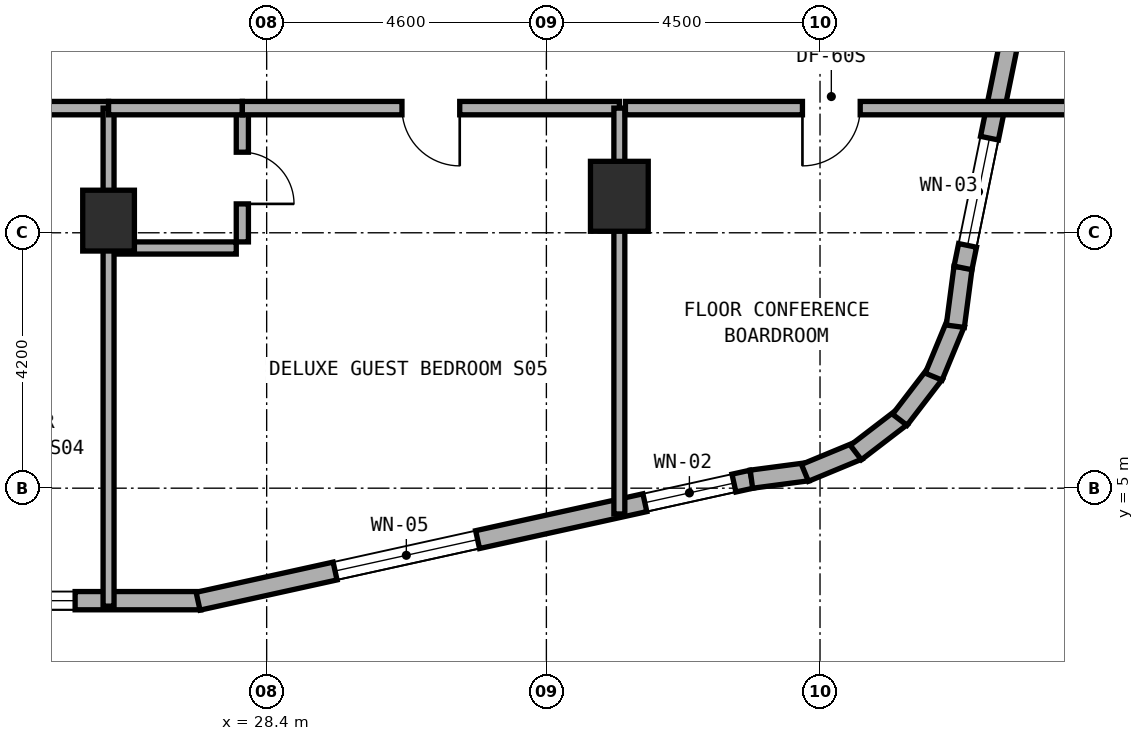
"""IFC4 building model, lengths in metres.
Left out: names, types, materials, properties, quantities, classifications, styles, units other than length and angle.
Written with IfcOpenShell. Run it as: python <this file> out.ifc"""

import sys

from ifc_helpers import new_model, si_unit, direction, frame, frame_2d, origin, origin_2d, place, context, subcontext, project, spatial, rectangle, extrude, element, fill, save


model = new_model("IFC4")
c1 = context("Model", 3, precision=1e-05, world=origin(), true_north=direction((0.0, 1.0)))
c2 = subcontext(c1, "Body", "Model", "MODEL_VIEW")
j1 = project(units=[si_unit("LENGTHUNIT", "METRE"), si_unit("PLANEANGLEUNIT", "RADIAN")], contexts=[c1])
p1 = place(None, origin())
s1 = spatial("IfcSite", under=j1, at=p1, CompositionType="ELEMENT")
p2 = place(p1, origin())
s2 = spatial("IfcBuilding", under=s1, at=p2, CompositionType="ELEMENT")
p3 = place(p2, frame((0.0, 0.0, 80.0)))
s3 = spatial("IfcBuildingStorey", under=s2, at=p3, CompositionType="ELEMENT", Elevation=80.0)
p4 = place(p3, frame((25.8, 9.4, 0.0), z_axis=(0.0, 0.0, 1.0), x_axis=(1.0, 0.0, 0.0)))
e1 = element("IfcColumn", 1, at=p4, inside=s3, PredefinedType="COLUMN", context=c2, shape_type="SweptSolid", body=[
    extrude(rectangle(XDim=0.85, YDim=1.0, at=origin_2d()), origin(), (0.0, 0.0, 1.0), 3.5),
])
p5 = place(p3, frame((34.2, 9.8, 0.0), z_axis=(0.0, 0.0, 1.0), x_axis=(1.0, 0.0, 0.0)))
e2 = element("IfcColumn", 2, at=p5, inside=s3, PredefinedType="COLUMN", context=c2, shape_type="SweptSolid", body=[
    extrude(rectangle(XDim=0.95, YDim=1.15, at=origin_2d()), origin(), (0.0, 0.0, 1.0), 3.5),
])
p6 = place(p3, frame((14.727, 3.15, 0.0), z_axis=(0.0, 0.0, 1.0), x_axis=(1.0, 0.0, 0.0)))
e3 = element("IfcWall", 3, at=p6, inside=s3, PredefinedType="STANDARD", context=c2, shape_type="SweptSolid", body=[
    extrude(rectangle(XDim=12.591, YDim=0.3, at=frame_2d((6.295, 0.0))), origin(), (0.0, 0.0, 1.0), 3.22),
])
p7 = place(p6, frame((5.713, 0.0, 0.0)))
e4 = element("IfcOpeningElement", 4, at=p7, cuts=e3, PredefinedType="OPENING", context=c2, shape_type="SweptSolid", body=[
    extrude(rectangle(XDim=1.2, YDim=2.15, at=frame_2d((0.6, 1.075))), frame((0.0, 0.16, 0.0), z_axis=(0.0, -1.0, 0.0), x_axis=(1.0, 0.0, 0.0)), (0.0, 0.0, 1.0), 0.32),
])
p8 = place(p6, frame((1.552, 0.0, 0.8)))
e5 = element("IfcOpeningElement", 5, at=p8, cuts=e3, PredefinedType="OPENING", context=c2, shape_type="SweptSolid", body=[
    extrude(rectangle(XDim=2.4, YDim=1.6, at=frame_2d((1.2, 0.8))), frame((0.0, 0.16, 0.0), z_axis=(0.0, -1.0, 0.0), x_axis=(1.0, 0.0, 0.0)), (0.0, 0.0, 1.0), 0.32),
])
p9 = place(p6, frame((8.723, 0.0, 0.85)))
e6 = element("IfcOpeningElement", 6, at=p9, cuts=e3, PredefinedType="OPENING", context=c2, shape_type="SweptSolid", body=[
    extrude(rectangle(XDim=1.8, YDim=1.5, at=frame_2d((0.9, 0.75))), frame((0.0, 0.16, 0.0), z_axis=(0.0, -1.0, 0.0), x_axis=(1.0, 0.0, 0.0)), (0.0, 0.0, 1.0), 0.32),
])
p10 = place(p3, frame((27.272, 3.141, 0.0), z_axis=(0.0, 0.0, 1.0), x_axis=(0.976555357219, 0.21526642629, 0.0)))
e7 = element("IfcWall", 7, at=p10, inside=s3, PredefinedType="STANDARD", context=c2, shape_type="SweptSolid", body=[
    extrude(rectangle(XDim=9.323, YDim=0.3, at=frame_2d((4.661, 0.0))), origin(), (0.0, 0.0, 1.0), 3.22),
])
p11 = place(p10, frame((2.307, 0.0, 0.8)))
e8 = element("IfcOpeningElement", 8, at=p11, cuts=e7, PredefinedType="OPENING", context=c2, shape_type="SweptSolid", body=[
    extrude(rectangle(XDim=2.4, YDim=1.6, at=frame_2d((1.2, 0.8))), frame((0.0, 0.16, 0.0), z_axis=(0.0, -1.0, 0.0), x_axis=(1.0, 0.0, 0.0)), (0.0, 0.0, 1.0), 0.32),
])
p12 = place(p10, frame((7.524, 0.0, 0.85)))
e9 = element("IfcOpeningElement", 9, at=p12, cuts=e7, PredefinedType="OPENING", context=c2, shape_type="SweptSolid", body=[
    extrude(rectangle(XDim=1.5, YDim=1.5, at=frame_2d((0.75, 0.75))), frame((0.0, 0.16, 0.0), z_axis=(0.0, -1.0, 0.0), x_axis=(1.0, 0.0, 0.0)), (0.0, 0.0, 1.0), 0.32),
])
p13 = place(p3, frame((36.372, 5.148, 0.0), z_axis=(0.0, 0.0, 1.0), x_axis=(0.991359246108, 0.131174864804, 0.0)))
e10 = element("IfcWall", 10, at=p13, inside=s3, PredefinedType="STANDARD", context=c2, shape_type="SweptSolid", body=[
    extrude(rectangle(XDim=0.938, YDim=0.3, at=frame_2d((0.469, 0.0))), origin(), (0.0, 0.0, 1.0), 3.22),
])
p14 = place(p3, frame((37.252, 5.252, 0.0), z_axis=(0.0, 0.0, 1.0), x_axis=(0.924019948111, 0.382344263057, 0.0)))
e11 = element("IfcWall", 11, at=p14, inside=s3, PredefinedType="STANDARD", context=c2, shape_type="SweptSolid", body=[
    extrude(rectangle(XDim=0.955, YDim=0.3, at=frame_2d((0.477, 0.0))), origin(), (0.0, 0.0, 1.0), 3.22),
])
p15 = place(p3, frame((38.089, 5.586, 0.0), z_axis=(0.0, 0.0, 1.0), x_axis=(0.793573440799, 0.608474481025, 0.0)))
e12 = element("IfcWall", 12, at=p15, inside=s3, PredefinedType="STANDARD", context=c2, shape_type="SweptSolid", body=[
    extrude(rectangle(XDim=0.955, YDim=0.3, at=frame_2d((0.478, 0.0))), origin(), (0.0, 0.0, 1.0), 3.22),
])
p16 = place(p3, frame((38.812, 6.125, 0.0), z_axis=(0.0, 0.0, 1.0), x_axis=(0.608351047625, 0.793668068435, 0.0)))
e13 = element("IfcWall", 13, at=p16, inside=s3, PredefinedType="STANDARD", context=c2, shape_type="SweptSolid", body=[
    extrude(rectangle(XDim=0.955, YDim=0.3, at=frame_2d((0.478, 0.0))), origin(), (0.0, 0.0, 1.0), 3.22),
])
p17 = place(p3, frame((39.369, 6.834, 0.0), z_axis=(0.0, 0.0, 1.0), x_axis=(0.382344263057, 0.924019948111, 0.0)))
e14 = element("IfcWall", 14, at=p17, inside=s3, PredefinedType="STANDARD", context=c2, shape_type="SweptSolid", body=[
    extrude(rectangle(XDim=0.955, YDim=0.3, at=frame_2d((0.477, 0.0))), origin(), (0.0, 0.0, 1.0), 3.22),
])
p18 = place(p3, frame((39.725, 7.663, 0.0), z_axis=(0.0, 0.0, 1.0), x_axis=(0.130454512571, 0.991454295543, 0.0)))
e15 = element("IfcWall", 15, at=p18, inside=s3, PredefinedType="STANDARD", context=c2, shape_type="SweptSolid", body=[
    extrude(rectangle(XDim=0.973, YDim=0.3, at=frame_2d((0.487, 0.0))), origin(), (0.0, 0.0, 1.0), 3.22),
])
p19 = place(p3, frame((39.851, 8.622, 0.0), z_axis=(0.0, 0.0, 1.0), x_axis=(0.199990901713, 0.979797754249, 0.0)))
e16 = element("IfcWall", 16, at=p19, inside=s3, PredefinedType="STANDARD", context=c2, shape_type="SweptSolid", body=[
    extrude(rectangle(XDim=10.065, YDim=0.3, at=frame_2d((5.033, 0.0))), origin(), (0.0, 0.0, 1.0), 3.22),
])
p20 = place(p19, frame((0.378, 0.0, 0.85)))
e17 = element("IfcOpeningElement", 17, at=p20, cuts=e16, PredefinedType="OPENING", context=c2, shape_type="SweptSolid", body=[
    extrude(rectangle(XDim=1.8, YDim=1.5, at=frame_2d((0.9, 0.75))), frame((0.0, 0.16, 0.0), z_axis=(0.0, -1.0, 0.0), x_axis=(1.0, 0.0, 0.0)), (0.0, 0.0, 1.0), 0.32),
])
p21 = place(p19, frame((5.236, 0.0, 0.8)))
e18 = element("IfcOpeningElement", 18, at=p21, cuts=e16, PredefinedType="OPENING", context=c2, shape_type="SweptSolid", body=[
    extrude(rectangle(XDim=2.4, YDim=1.6, at=frame_2d((1.2, 0.8))), frame((0.0, 0.16, 0.0), z_axis=(0.0, -1.0, 0.0), x_axis=(1.0, 0.0, 0.0)), (0.0, 0.0, 1.0), 0.32),
])
p22 = place(p3, frame((10.0, 11.25, 0.0), z_axis=(0.0, 0.0, 1.0), x_axis=(1.0, 0.0, 0.0)))
e19 = element("IfcWall", 19, at=p22, inside=s3, PredefinedType="SOLIDWALL", context=c2, shape_type="SweptSolid", body=[
    extrude(rectangle(XDim=15.8, YDim=0.22, at=frame_2d((7.9, 0.0))), origin(), (0.0, 0.0, 1.0), 2.495),
])
p23 = place(p22, frame((7.425, 0.0, 0.0)))
e20 = element("IfcOpeningElement", 20, at=p23, cuts=e19, PredefinedType="OPENING", context=c2, shape_type="SweptSolid", body=[
    extrude(rectangle(XDim=0.95, YDim=2.1, at=frame_2d((0.475, 1.05))), frame((0.0, 0.12, 0.0), z_axis=(0.0, -1.0, 0.0), x_axis=(1.0, 0.0, 0.0)), (0.0, 0.0, 1.0), 0.24),
])
p24 = place(p3, frame((25.8, 3.06, 0.0), z_axis=(0.0, 0.0, 1.0), x_axis=(0.0, 1.0, 0.0)))
e21 = element("IfcWall", 21, at=p24, inside=s3, PredefinedType="SOLIDWALL", context=c2, shape_type="SweptSolid", body=[
    extrude(rectangle(XDim=8.19, YDim=0.18, at=frame_2d((4.095, 0.0))), origin(), (0.0, 0.0, 1.0), 2.495),
])
p25 = place(p3, frame((28.0, 9.05, 0.0), z_axis=(0.0, 0.0, 1.0), x_axis=(0.0, 1.0, 0.0)))
e22 = element("IfcWall", 22, at=p25, inside=s3, PredefinedType="PLUMBINGWALL", context=c2, shape_type="SweptSolid", body=[
    extrude(rectangle(XDim=2.1, YDim=0.2, at=frame_2d((1.05, 0.0))), origin(), (0.0, 0.0, 1.0), 2.745),
])
p26 = place(p25, frame((0.625, 0.0, 0.0)))
e23 = element("IfcOpeningElement", 23, at=p26, cuts=e22, PredefinedType="OPENING", context=c2, shape_type="SweptSolid", body=[
    extrude(rectangle(XDim=0.85, YDim=2.1, at=frame_2d((0.425, 1.05))), frame((0.0, 0.11, 0.0), z_axis=(0.0, -1.0, 0.0), x_axis=(1.0, 0.0, 0.0)), (0.0, 0.0, 1.0), 0.22),
])
p27 = place(p3, frame((25.9, 8.95, 0.0), z_axis=(0.0, 0.0, 1.0), x_axis=(1.0, 0.0, 0.0)))
e24 = element("IfcWall", 24, at=p27, inside=s3, PredefinedType="PLUMBINGWALL", context=c2, shape_type="SweptSolid", body=[
    extrude(rectangle(XDim=2.0, YDim=0.2, at=frame_2d((1.0, 0.0))), origin(), (0.0, 0.0, 1.0), 3.22),
])
p28 = place(p3, frame((25.8, 11.25, 0.0), z_axis=(0.0, 0.0, 1.0), x_axis=(1.0, 0.0, 0.0)))
e25 = element("IfcWall", 25, at=p28, inside=s3, PredefinedType="SOLIDWALL", context=c2, shape_type="SweptSolid", body=[
    extrude(rectangle(XDim=2.2, YDim=0.22, at=frame_2d((1.1, 0.0))), origin(), (0.0, 0.0, 1.0), 2.495),
])
p29 = place(p3, frame((28.0, 11.25, 0.0), z_axis=(0.0, 0.0, 1.0), x_axis=(1.0, 0.0, 0.0)))
e26 = element("IfcWall", 26, at=p29, inside=s3, PredefinedType="SOLIDWALL", context=c2, shape_type="SweptSolid", body=[
    extrude(rectangle(XDim=6.2, YDim=0.22, at=frame_2d((3.1, 0.0))), origin(), (0.0, 0.0, 1.0), 2.495),
])
p30 = place(p29, frame((2.625, 0.0, 0.0)))
e27 = element("IfcOpeningElement", 27, at=p30, cuts=e26, PredefinedType="OPENING", context=c2, shape_type="SweptSolid", body=[
    extrude(rectangle(XDim=0.95, YDim=2.1, at=frame_2d((0.475, 1.05))), frame((0.0, 0.12, 0.0), z_axis=(0.0, -1.0, 0.0), x_axis=(1.0, 0.0, 0.0)), (0.0, 0.0, 1.0), 0.24),
])
p31 = place(p3, frame((34.2, 4.576, 0.0), z_axis=(0.0, 0.0, 1.0), x_axis=(0.0, 1.0, 0.0)))
e28 = element("IfcWall", 28, at=p31, inside=s3, PredefinedType="SOLIDWALL", context=c2, shape_type="SweptSolid", body=[
    extrude(rectangle(XDim=6.674, YDim=0.18, at=frame_2d((3.337, 0.0))), origin(), (0.0, 0.0, 1.0), 2.495),
])
p32 = place(p3, frame((34.3, 11.25, 0.0), z_axis=(0.0, 0.0, 1.0), x_axis=(1.0, 0.0, 0.0)))
e29 = element("IfcWall", 29, at=p32, inside=s3, PredefinedType="SOLIDWALL", context=c2, shape_type="SweptSolid", body=[
    extrude(rectangle(XDim=7.44, YDim=0.22, at=frame_2d((3.72, 0.0))), origin(), (0.0, 0.0, 1.0), 2.745),
])
p33 = place(p32, frame((2.911, 0.0, 0.0)))
e30 = element("IfcOpeningElement", 30, at=p33, cuts=e29, PredefinedType="OPENING", context=c2, shape_type="SweptSolid", body=[
    extrude(rectangle(XDim=0.95, YDim=2.1, at=frame_2d((0.475, 1.05))), frame((0.0, 0.12, 0.0), z_axis=(0.0, -1.0, 0.0), x_axis=(1.0, 0.0, 0.0)), (0.0, 0.0, 1.0), 0.24),
])
p34 = place(p9, origin())
e31 = element("IfcWindow", 31, at=p34, inside=s3, PartitioningType="SINGLE_PANEL", PredefinedType="WINDOW", context=c2, shape_type="SweptSolid", body=[
    extrude(rectangle(XDim=1.8, YDim=1.5, at=frame_2d((0.9, 0.75))), frame((0.0, 0.03, 0.0), z_axis=(0.0, -1.0, 0.0), x_axis=(1.0, 0.0, 0.0)), (0.0, 0.0, 1.0), 0.06),
])
fill(e6, e31)
p35 = place(p11, origin())
e32 = element("IfcWindow", 32, at=p35, inside=s3, PartitioningType="SINGLE_PANEL", PredefinedType="WINDOW", context=c2, shape_type="SweptSolid", body=[
    extrude(rectangle(XDim=2.4, YDim=1.6, at=frame_2d((1.2, 0.8))), frame((0.0, 0.03, 0.0), z_axis=(0.0, -1.0, 0.0), x_axis=(1.0, 0.0, 0.0)), (0.0, 0.0, 1.0), 0.06),
])
fill(e8, e32)
p36 = place(p12, origin())
e33 = element("IfcWindow", 33, at=p36, inside=s3, PartitioningType="SINGLE_PANEL", PredefinedType="WINDOW", context=c2, shape_type="SweptSolid", body=[
    extrude(rectangle(XDim=1.5, YDim=1.5, at=frame_2d((0.75, 0.75))), frame((0.0, 0.03, 0.0), z_axis=(0.0, -1.0, 0.0), x_axis=(1.0, 0.0, 0.0)), (0.0, 0.0, 1.0), 0.06),
])
fill(e9, e33)
p37 = place(p20, origin())
e34 = element("IfcWindow", 34, at=p37, inside=s3, PartitioningType="SINGLE_PANEL", PredefinedType="WINDOW", context=c2, shape_type="SweptSolid", body=[
    extrude(rectangle(XDim=1.8, YDim=1.5, at=frame_2d((0.9, 0.75))), frame((0.0, 0.03, 0.0), z_axis=(0.0, -1.0, 0.0), x_axis=(1.0, 0.0, 0.0)), (0.0, 0.0, 1.0), 0.06),
])
fill(e17, e34)
p38 = place(p26, frame((0.85, 0.0, 0.0), z_axis=(0.0, 0.0, 1.0), x_axis=(-1.0, 0.0, 0.0)))
e35 = element("IfcDoor", 35, at=p38, inside=s3, OperationType="SINGLE_SWING_RIGHT", PredefinedType="DOOR", context=c2, shape_type="SweptSolid", body=[
    extrude(rectangle(XDim=0.85, YDim=2.1, at=frame_2d((0.425, 1.05))), frame((0.0, 0.025, 0.0), z_axis=(0.0, -1.0, 0.0), x_axis=(1.0, 0.0, 0.0)), (0.0, 0.0, 1.0), 0.05),
])
fill(e23, e35)
p39 = place(p30, frame((0.95, 0.0, 0.0), z_axis=(0.0, 0.0, 1.0), x_axis=(-1.0, 0.0, 0.0)))
e36 = element("IfcDoor", 36, at=p39, inside=s3, OperationType="SINGLE_SWING_LEFT", PredefinedType="DOOR", context=c2, shape_type="SweptSolid", body=[
    extrude(rectangle(XDim=0.95, YDim=2.1, at=frame_2d((0.475, 1.05))), frame((0.0, 0.025, 0.0), z_axis=(0.0, -1.0, 0.0), x_axis=(1.0, 0.0, 0.0)), (0.0, 0.0, 1.0), 0.05),
])
fill(e27, e36)
p40 = place(p33, frame((0.95, 0.0, 0.0), z_axis=(0.0, 0.0, 1.0), x_axis=(-1.0, 0.0, 0.0)))
e37 = element("IfcDoor", 37, at=p40, inside=s3, OperationType="SINGLE_SWING_RIGHT", PredefinedType="DOOR", context=c2, shape_type="SweptSolid", body=[
    extrude(rectangle(XDim=0.95, YDim=2.1, at=frame_2d((0.475, 1.05))), frame((0.0, 0.025, 0.0), z_axis=(0.0, -1.0, 0.0), x_axis=(1.0, 0.0, 0.0)), (0.0, 0.0, 1.0), 0.05),
])
fill(e30, e37)
save(model, sys.argv[1])
